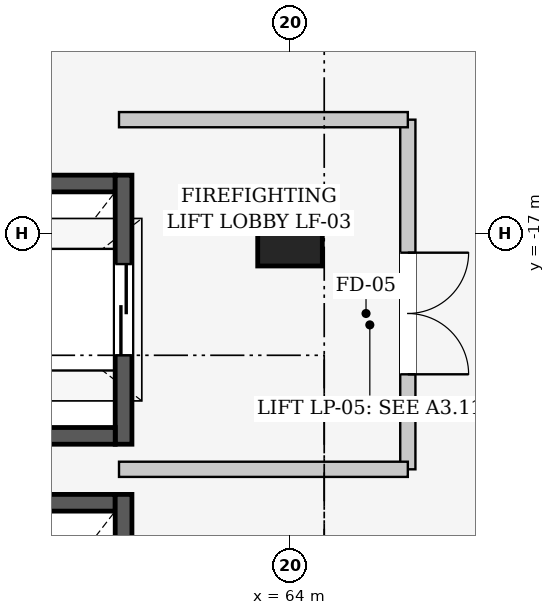
"""IFC4 building model, lengths in metres.
Left out: names, types, materials, properties, quantities, classifications, styles, units other than length and angle.
Written with IfcOpenShell. Run it as: python <this file> out.ifc"""

import sys

from ifc_helpers import new_model, si_unit, direction, frame, frame_2d, origin, origin_2d, place, context, subcontext, project, spatial, rectangle, extrude, element, fill, save


model = new_model("IFC4")
c1 = context("Model", 3, precision=1e-05, world=origin(), true_north=direction((0.0, 1.0)))
c2 = subcontext(c1, "Body", "Model", "MODEL_VIEW")
j1 = project(units=[si_unit("LENGTHUNIT", "METRE"), si_unit("PLANEANGLEUNIT", "RADIAN")], contexts=[c1])
p1 = place(None, origin())
s1 = spatial("IfcSite", under=j1, at=p1, CompositionType="ELEMENT")
p2 = place(p1, origin())
s2 = spatial("IfcBuilding", under=s1, at=p2, CompositionType="ELEMENT")
p3 = place(p2, frame((0.0, 0.0, 16.2)))
s3 = spatial("IfcBuildingStorey", under=s2, at=p3, CompositionType="ELEMENT", Elevation=16.2)
p4 = place(p3, frame((64.0, -17.0, 0.0), z_axis=(0.0, 0.0, 1.0), x_axis=(1.0, 0.0, 0.0)))
e1 = element("IfcColumn", 1, at=p4, inside=s3, PredefinedType="COLUMN", context=c2, shape_type="SweptSolid", body=[
    extrude(rectangle(XDim=0.85, YDim=0.85, at=origin_2d()), origin(), (0.0, 0.0, 1.0), 4.8),
])
p5 = place(p3, frame((59.3, -16.34, 0.0), z_axis=(0.0, 0.0, 1.0), x_axis=(1.0, 0.0, 0.0)))
e2 = element("IfcWall", 2, at=p5, inside=s3, PredefinedType="SHEAR", context=c2, shape_type="SweptSolid", body=[
    extrude(rectangle(XDim=2.4, YDim=0.22, at=frame_2d((1.2, 0.0))), origin(), (0.0, 0.0, 1.0), 4.8),
])
p6 = place(p3, frame((61.81, -16.23, 0.0), z_axis=(0.0, 0.0, 1.0), x_axis=(0.0, -1.0, 0.0)))
e3 = element("IfcWall", 3, at=p6, inside=s3, PredefinedType="SHEAR", context=c2, shape_type="SweptSolid", body=[
    extrude(rectangle(XDim=3.54, YDim=0.22, at=frame_2d((1.77, 0.0))), origin(), (0.0, 0.0, 1.0), 4.8),
])
p7 = place(p6, frame((1.17, 0.0, 0.0)))
e4 = element("IfcOpeningElement", 4, at=p7, cuts=e3, PredefinedType="OPENING", context=c2, shape_type="SweptSolid", body=[
    extrude(rectangle(XDim=1.2, YDim=2.2, at=frame_2d((0.6, 1.1))), frame((0.0, 0.12, 0.0), z_axis=(0.0, -1.0, 0.0), x_axis=(1.0, 0.0, 0.0)), (0.0, 0.0, 1.0), 0.24),
])
for number, where, z_axis, x_axis in (
    (5, (61.7, -19.66, 0.0), (0.0, 0.0, 1.0), (-1.0, 0.0, 0.0)),
    (6, (59.3, -20.54, 0.0), (0.0, 0.0, 1.0), (1.0, 0.0, 0.0)),
):
    element("IfcWall", number, at=place(p3, frame(where, z_axis=z_axis, x_axis=x_axis)), inside=s3, PredefinedType="SHEAR", context=c2, shape_type="SweptSolid", body=[
        extrude(rectangle(XDim=2.4, YDim=0.22, at=frame_2d((1.2, 0.0))), origin(), (0.0, 0.0, 1.0), 4.8),
    ])
p8 = place(p3, frame((61.81, -20.43, 0.0), z_axis=(0.0, 0.0, 1.0), x_axis=(0.0, -1.0, 0.0)))
e7 = element("IfcWall", 7, at=p8, inside=s3, PredefinedType="SHEAR", context=c2, shape_type="SweptSolid", body=[
    extrude(rectangle(XDim=3.54, YDim=0.22, at=frame_2d((1.77, 0.0))), origin(), (0.0, 0.0, 1.0), 4.8),
])
p9 = place(p8, frame((1.22, 0.0, 0.0)))
e8 = element("IfcOpeningElement", 8, at=p9, cuts=e7, PredefinedType="OPENING", context=c2, shape_type="SweptSolid", body=[
    extrude(rectangle(XDim=1.1, YDim=2.2, at=frame_2d((0.55, 1.1))), frame((0.0, 0.12, 0.0), z_axis=(0.0, -1.0, 0.0), x_axis=(1.0, 0.0, 0.0)), (0.0, 0.0, 1.0), 0.24),
])
p10 = place(p3, frame((65.55, -15.5, 0.0), z_axis=(0.0, 0.0, 1.0), x_axis=(0.0, -1.0, 0.0)))
e9 = element("IfcWall", 9, at=p10, inside=s3, PredefinedType="PARTITIONING", context=c2, shape_type="SweptSolid", body=[
    extrude(rectangle(XDim=4.6, YDim=0.2, at=frame_2d((2.3, 0.0))), origin(), (0.0, 0.0, 1.0), 3.545),
])
p11 = place(p10, frame((1.75, 0.0, 0.0)))
e10 = element("IfcOpeningElement", 10, at=p11, cuts=e9, PredefinedType="OPENING", context=c2, shape_type="SweptSolid", body=[
    extrude(rectangle(XDim=1.6, YDim=2.2, at=frame_2d((0.8, 1.1))), frame((0.0, 0.11, 0.0), z_axis=(0.0, -1.0, 0.0), x_axis=(1.0, 0.0, 0.0)), (0.0, 0.0, 1.0), 0.22),
])
for number, where, z_axis, x_axis in (
    (11, (61.75, -15.5, 0.0), (0.0, 0.0, 1.0), (1.0, 0.0, 0.0)),
    (12, (65.55, -20.1, 0.0), (0.0, 0.0, 1.0), (-1.0, 0.0, 0.0)),
):
    element("IfcWall", number, at=place(p3, frame(where, z_axis=z_axis, x_axis=x_axis)), inside=s3, PredefinedType="PARTITIONING", context=c2, shape_type="SweptSolid", body=[
        extrude(rectangle(XDim=3.8, YDim=0.2, at=frame_2d((1.9, 0.0))), origin(), (0.0, 0.0, 1.0), 3.845),
    ])
p12 = place(p7, origin())
e13 = element("IfcDoor", 13, at=p12, inside=s3, OperationType="SLIDING_TO_LEFT", PredefinedType="DOOR", context=c2, shape_type="SweptSolid", body=[
    extrude(rectangle(XDim=1.2, YDim=2.2, at=frame_2d((0.6, 1.1))), frame((0.0, 0.025, 0.0), z_axis=(0.0, -1.0, 0.0), x_axis=(1.0, 0.0, 0.0)), (0.0, 0.0, 1.0), 0.05),
])
fill(e4, e13)
p13 = place(p11, origin())
e14 = element("IfcDoor", 14, at=p13, inside=s3, OperationType="DOUBLE_DOOR_SINGLE_SWING", PredefinedType="DOOR", context=c2, shape_type="SweptSolid", body=[
    extrude(rectangle(XDim=1.6, YDim=2.2, at=frame_2d((0.8, 1.1))), frame((0.0, 0.025, 0.0), z_axis=(0.0, -1.0, 0.0), x_axis=(1.0, 0.0, 0.0)), (0.0, 0.0, 1.0), 0.05),
])
fill(e10, e14)
save(model, sys.argv[1])
